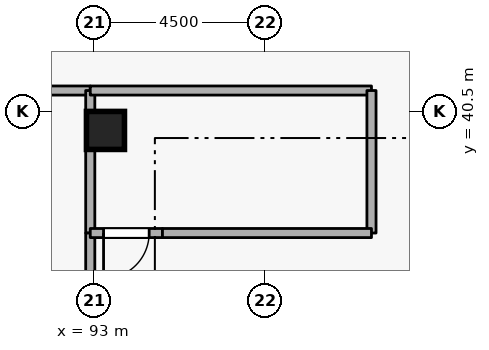
"""IFC4 building model, lengths in metres.
Left out: names, types, materials, properties, quantities, classifications, styles, units other than length and angle.
Written with IfcOpenShell. Run it as: python <this file> out.ifc"""

import sys

from ifc_helpers import new_model, si_unit, direction, frame, frame_2d, origin, origin_2d, place, context, subcontext, project, spatial, rectangle, extrude, element, fill, save


model = new_model("IFC4")
c1 = context("Model", 3, precision=1e-05, world=origin(), true_north=direction((0.0, 1.0)))
c2 = subcontext(c1, "Body", "Model", "MODEL_VIEW")
j1 = project(units=[si_unit("LENGTHUNIT", "METRE"), si_unit("PLANEANGLEUNIT", "RADIAN")], contexts=[c1])
p1 = place(None, origin())
s1 = spatial("IfcSite", under=j1, at=p1, CompositionType="ELEMENT")
p2 = place(p1, origin())
s2 = spatial("IfcBuilding", under=s1, at=p2, CompositionType="ELEMENT")
p3 = place(p2, frame((0.0, 0.0, 221.7)))
s3 = spatial("IfcBuildingStorey", under=s2, at=p3, CompositionType="ELEMENT", Elevation=221.7)
p4 = place(p3, frame((93.3, 40.0, 0.0), z_axis=(0.0, 0.0, 1.0), x_axis=(1.0, 0.0, 0.0)))
e1 = element("IfcColumn", 1, at=p4, inside=s3, PredefinedType="COLUMN", context=c2, shape_type="SweptSolid", body=[
    extrude(rectangle(XDim=1.0, YDim=1.0, at=origin_2d()), origin(), (0.0, 0.0, 1.0), 4.2),
])
p5 = place(p3, frame((88.5, 41.05, 0.0), z_axis=(0.0, 0.0, 1.0), x_axis=(1.0, 0.0, 0.0)))
e2 = element("IfcWall", 2, at=p5, inside=s3, PredefinedType="STANDARD", context=c2, shape_type="SweptSolid", body=[
    extrude(rectangle(XDim=4.4, YDim=0.24, at=frame_2d((2.2, 0.0))), origin(), (0.0, 0.0, 1.0), 3.94),
])
p6 = place(p3, frame((92.9, 41.05, 0.0), z_axis=(0.0, 0.0, 1.0), x_axis=(0.0, -1.0, 0.0)))
e3 = element("IfcWall", 3, at=p6, inside=s3, PredefinedType="STANDARD", context=c2, shape_type="SweptSolid", body=[
    extrude(rectangle(XDim=3.75, YDim=0.24, at=frame_2d((1.875, 0.0))), origin(), (0.0, 0.0, 1.0), 3.94),
])
p7 = place(p3, frame((92.9, 37.3, 0.0), z_axis=(0.0, 0.0, 1.0), x_axis=(0.0, -1.0, 0.0)))
e4 = element("IfcWall", 4, at=p7, inside=s3, PredefinedType="STANDARD", context=c2, shape_type="SweptSolid", body=[
    extrude(rectangle(XDim=2.9, YDim=0.24, at=frame_2d((1.45, 0.0))), origin(), (0.0, 0.0, 1.0), 3.94),
])
p8 = place(p3, frame((94.8, 37.3, 0.0), z_axis=(0.0, 0.0, 1.0), x_axis=(-1.0, 0.0, 0.0)))
e5 = element("IfcWall", 5, at=p8, inside=s3, PredefinedType="STANDARD", context=c2, shape_type="SweptSolid", body=[
    extrude(rectangle(XDim=1.9, YDim=0.24, at=frame_2d((0.95, 0.0))), origin(), (0.0, 0.0, 1.0), 3.94),
])
p9 = place(p8, frame((0.35, 0.0, 0.0)))
e6 = element("IfcOpeningElement", 6, at=p9, cuts=e5, PredefinedType="OPENING", context=c2, shape_type="SweptSolid", body=[
    extrude(rectangle(XDim=1.2, YDim=2.1, at=frame_2d((0.6, 1.05))), frame((0.0, 0.13, 0.0), z_axis=(0.0, -1.0, 0.0), x_axis=(1.0, 0.0, 0.0)), (0.0, 0.0, 1.0), 0.26),
])
p10 = place(p3, frame((92.9, 41.05, 0.0), z_axis=(0.0, 0.0, 1.0), x_axis=(1.0, 0.0, 0.0)))
e7 = element("IfcWall", 7, at=p10, inside=s3, PredefinedType="STANDARD", context=c2, shape_type="SweptSolid", body=[
    extrude(rectangle(XDim=7.4, YDim=0.24, at=frame_2d((3.7, 0.0))), origin(), (0.0, 0.0, 1.0), 3.94),
])
p11 = place(p3, frame((100.3, 41.05, 0.0), z_axis=(0.0, 0.0, 1.0), x_axis=(0.0, -1.0, 0.0)))
e8 = element("IfcWall", 8, at=p11, inside=s3, PredefinedType="STANDARD", context=c2, shape_type="SweptSolid", body=[
    extrude(rectangle(XDim=3.75, YDim=0.24, at=frame_2d((1.875, 0.0))), origin(), (0.0, 0.0, 1.0), 3.94),
])
p12 = place(p3, frame((100.3, 37.3, 0.0), z_axis=(0.0, 0.0, 1.0), x_axis=(-1.0, 0.0, 0.0)))
e9 = element("IfcWall", 9, at=p12, inside=s3, PredefinedType="STANDARD", context=c2, shape_type="SweptSolid", body=[
    extrude(rectangle(XDim=5.5, YDim=0.24, at=frame_2d((2.75, 0.0))), origin(), (0.0, 0.0, 1.0), 3.94),
])
p13 = place(p9, origin())
e10 = element("IfcDoor", 10, at=p13, inside=s3, OperationType="SINGLE_SWING_RIGHT", PredefinedType="DOOR", context=c2, shape_type="SweptSolid", body=[
    extrude(rectangle(XDim=1.2, YDim=2.1, at=frame_2d((0.6, 1.05))), frame((0.0, 0.025, 0.0), z_axis=(0.0, -1.0, 0.0), x_axis=(1.0, 0.0, 0.0)), (0.0, 0.0, 1.0), 0.05),
])
fill(e6, e10)
save(model, sys.argv[1])
